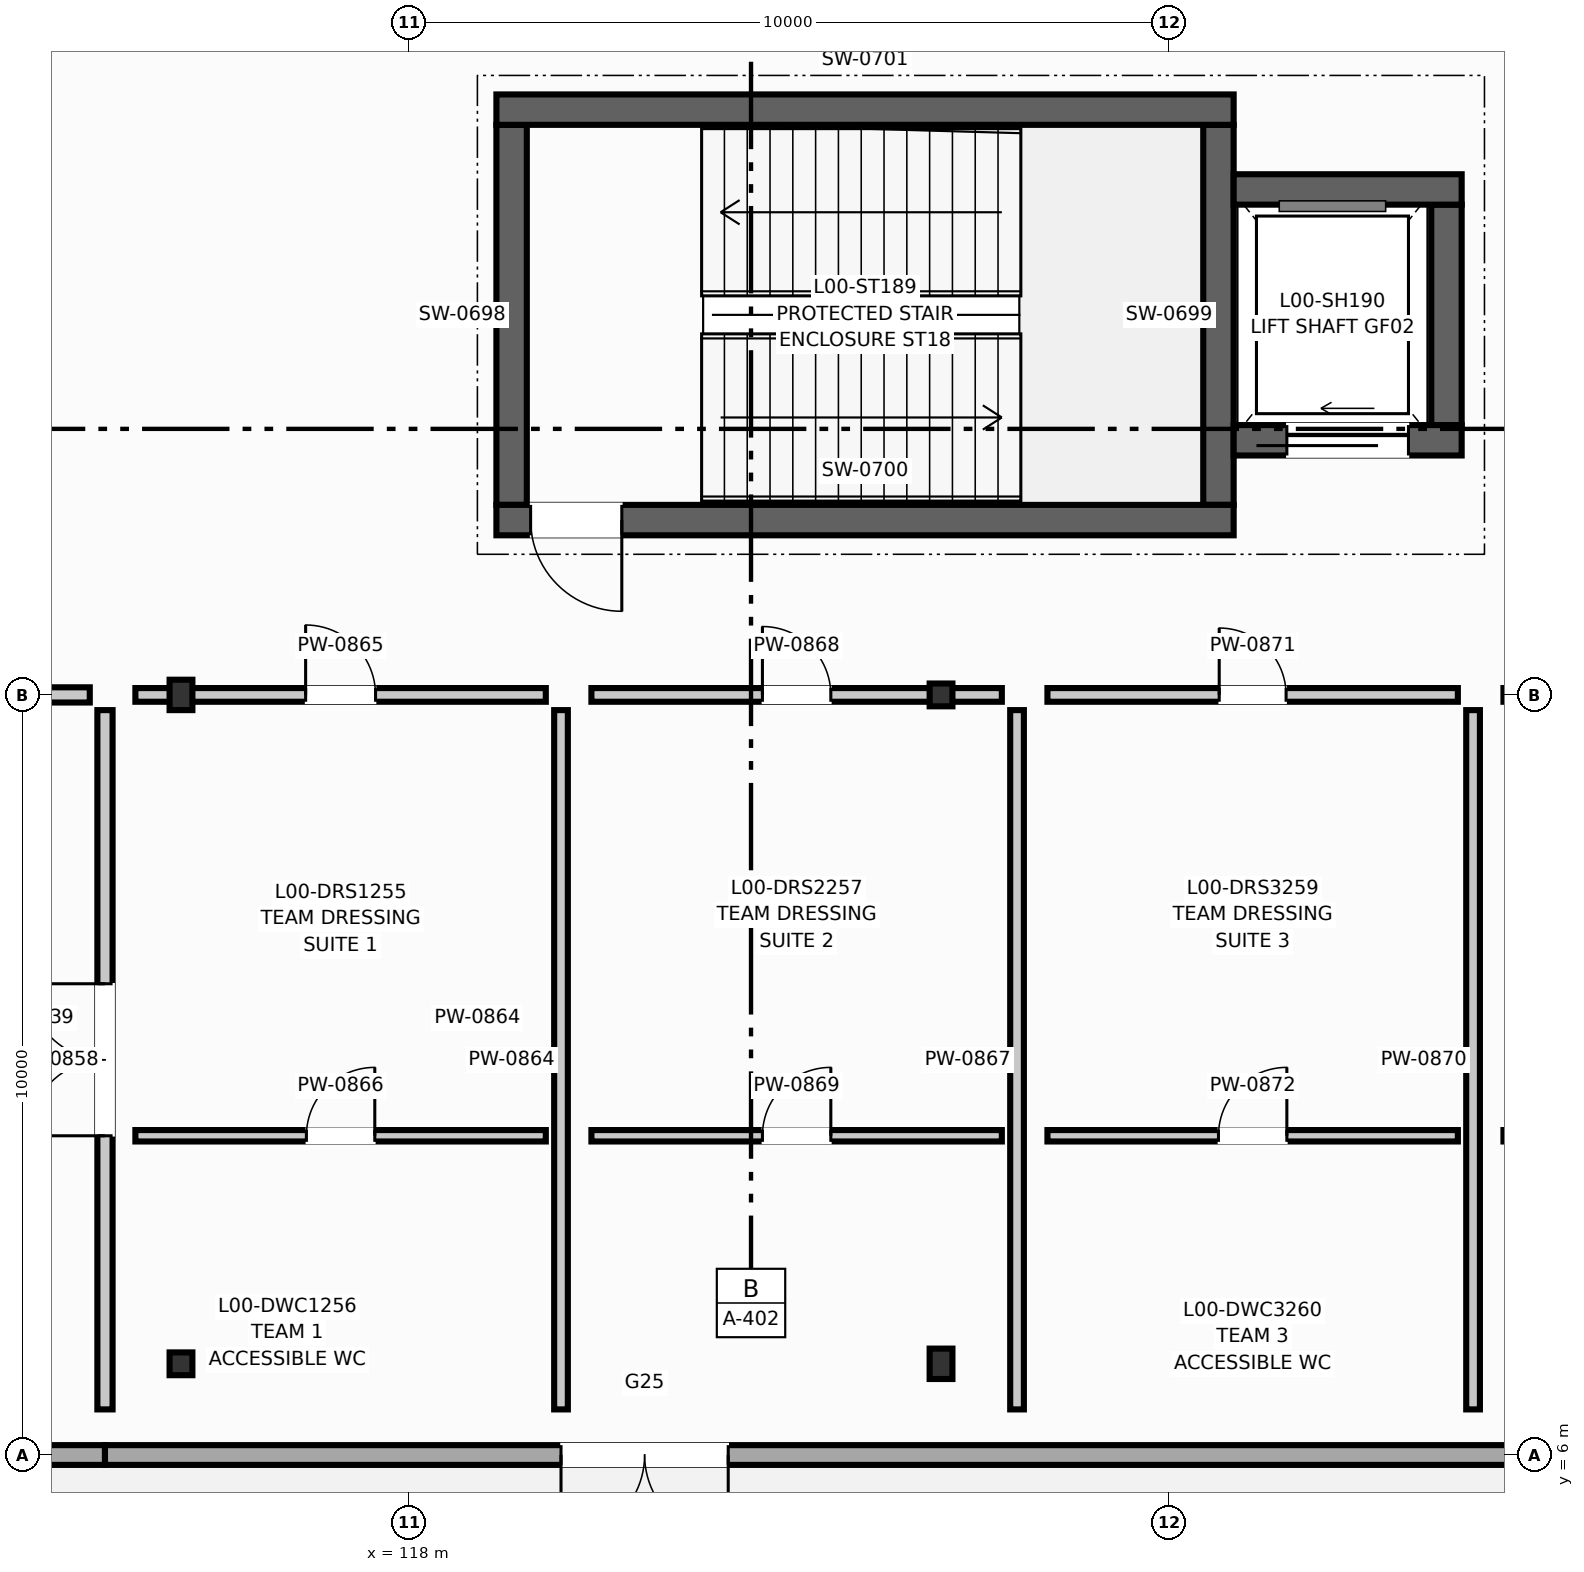
"""IFC4 building model, lengths in metres.
Left out: names, types, materials, properties, quantities, classifications, styles, units other than length and angle.
Written with IfcOpenShell. Run it as: python <this file> out.ifc"""

import sys

from ifc_helpers import new_model, si_unit, direction, frame, frame_2d, origin, origin_2d, place, context, subcontext, project, spatial, rectangle, i_section, extrude, element, fill, save


model = new_model("IFC4")
c1 = context("Model", 3, precision=1e-05, world=origin(), true_north=direction((0.0, 1.0)))
c2 = subcontext(c1, "Body", "Model", "MODEL_VIEW")
j1 = project(units=[si_unit("LENGTHUNIT", "METRE"), si_unit("PLANEANGLEUNIT", "RADIAN")], contexts=[c1])
p1 = place(None, origin())
s1 = spatial("IfcSite", under=j1, at=p1, CompositionType="ELEMENT")
p2 = place(p1, origin())
s2 = spatial("IfcBuilding", under=s1, at=p2, CompositionType="ELEMENT")
p3 = place(p2, origin())
s3 = spatial("IfcBuildingStorey", under=s2, at=p3, CompositionType="ELEMENT", Elevation=0.0)
p4 = place(p3, frame((115.0, 7.2, 0.0), z_axis=(0.0, 0.0, 1.0), x_axis=(1.0, 0.0, 0.0)))
e1 = element("IfcColumn", 1, at=p4, inside=s3, PredefinedType="COLUMN", context=c2, shape_type="SweptSolid", body=[
    extrude(i_section(OverallWidth=0.3, OverallDepth=0.3, WebThickness=0.011, FlangeThickness=0.019, at=origin_2d()), origin(), (0.0, 0.0, 1.0), 4.5),
])
for number, where, z_axis, x_axis in (
    (2, (115.0, 16.0, 0.0), (0.0, 0.0, 1.0), (1.0, 0.0, 0.0)),
    (3, (125.0, 7.2, 0.0), (0.0, 0.0, 1.0), (1.0, 0.0, 0.0)),
):
    element("IfcColumn", number, at=place(p3, frame(where, z_axis=z_axis, x_axis=x_axis)), inside=s3, PredefinedType="COLUMN", context=c2, shape_type="SweptSolid", body=[
        extrude(i_section(OverallWidth=0.3, OverallDepth=0.4, WebThickness=0.013, FlangeThickness=0.024, at=origin_2d()), origin(), (0.0, 0.0, 1.0), 4.5),
    ])
p5 = place(p3, frame((125.0, 16.0, 0.0), z_axis=(0.0, 0.0, 1.0), x_axis=(1.0, 0.0, 0.0)))
e4 = element("IfcColumn", 4, at=p5, inside=s3, PredefinedType="COLUMN", context=c2, shape_type="SweptSolid", body=[
    extrude(i_section(OverallWidth=0.3, OverallDepth=0.3, WebThickness=0.011, FlangeThickness=0.019, at=origin_2d()), origin(), (0.0, 0.0, 1.0), 4.5),
])
p6 = place(p3, frame((74.0, 6.0, 0.0), z_axis=(0.0, 0.0, 1.0), x_axis=(1.0, 0.0, 0.0)))
e5 = element("IfcWall", 5, at=p6, inside=s3, PredefinedType="SOLIDWALL", context=c2, shape_type="SweptSolid", body=[
    extrude(rectangle(XDim=40.0, YDim=0.26, at=frame_2d((20.0, 0.0))), origin(), (0.0, 0.0, 1.0), 4.25),
])
p7 = place(p6, frame((3.2, 0.0, 0.0)))
e6 = element("IfcOpeningElement", 6, at=p7, cuts=e5, PredefinedType="OPENING", context=c2, shape_type="SweptSolid", body=[
    extrude(rectangle(XDim=4.2, YDim=4.1, at=frame_2d((2.1, 2.05))), frame((0.0, 0.14, 0.0), z_axis=(0.0, -1.0, 0.0), x_axis=(1.0, 0.0, 0.0)), (0.0, 0.0, 1.0), 0.28),
])
p8 = place(p6, frame((12.2, 0.0, 0.0)))
e7 = element("IfcOpeningElement", 7, at=p8, cuts=e5, PredefinedType="OPENING", context=c2, shape_type="SweptSolid", body=[
    extrude(rectangle(XDim=4.2, YDim=4.1, at=frame_2d((2.1, 2.05))), frame((0.0, 0.14, 0.0), z_axis=(0.0, -1.0, 0.0), x_axis=(1.0, 0.0, 0.0)), (0.0, 0.0, 1.0), 0.28),
])
p9 = place(p6, frame((21.2, 0.0, 0.0)))
e8 = element("IfcOpeningElement", 8, at=p9, cuts=e5, PredefinedType="OPENING", context=c2, shape_type="SweptSolid", body=[
    extrude(rectangle(XDim=4.2, YDim=4.1, at=frame_2d((2.1, 2.05))), frame((0.0, 0.14, 0.0), z_axis=(0.0, -1.0, 0.0), x_axis=(1.0, 0.0, 0.0)), (0.0, 0.0, 1.0), 0.28),
])
p10 = place(p6, frame((30.2, 0.0, 0.0)))
e9 = element("IfcOpeningElement", 9, at=p10, cuts=e5, PredefinedType="OPENING", context=c2, shape_type="SweptSolid", body=[
    extrude(rectangle(XDim=4.2, YDim=4.1, at=frame_2d((2.1, 2.05))), frame((0.0, 0.14, 0.0), z_axis=(0.0, -1.0, 0.0), x_axis=(1.0, 0.0, 0.0)), (0.0, 0.0, 1.0), 0.28),
])
p11 = place(p3, frame((114.0, 6.0, 0.0), z_axis=(0.0, 0.0, 1.0), x_axis=(1.0, 0.0, 0.0)))
e10 = element("IfcWall", 10, at=p11, inside=s3, PredefinedType="SOLIDWALL", context=c2, shape_type="SweptSolid", body=[
    extrude(rectangle(XDim=50.0, YDim=0.26, at=frame_2d((25.0, 0.0))), origin(), (0.0, 0.0, 1.0), 3.5),
])
p12 = place(p11, frame((25.5, 0.0, 0.0)))
e11 = element("IfcOpeningElement", 11, at=p12, cuts=e10, PredefinedType="OPENING", context=c2, shape_type="SweptSolid", body=[
    extrude(rectangle(XDim=1.1, YDim=2.25, at=frame_2d((0.55, 1.125))), frame((0.0, 0.14, 0.0), z_axis=(0.0, -1.0, 0.0), x_axis=(1.0, 0.0, 0.0)), (0.0, 0.0, 1.0), 0.28),
])
p13 = place(p11, frame((6.0, 0.0, 0.0)))
e12 = element("IfcOpeningElement", 12, at=p13, cuts=e10, PredefinedType="OPENING", context=c2, shape_type="SweptSolid", body=[
    extrude(rectangle(XDim=2.2, YDim=2.45, at=frame_2d((1.1, 1.225))), frame((0.0, 0.14, 0.0), z_axis=(0.0, -1.0, 0.0), x_axis=(1.0, 0.0, 0.0)), (0.0, 0.0, 1.0), 0.28),
])
p14 = place(p11, frame((36.0, 0.0, 0.0)))
e13 = element("IfcOpeningElement", 13, at=p14, cuts=e10, PredefinedType="OPENING", context=c2, shape_type="SweptSolid", body=[
    extrude(rectangle(XDim=2.2, YDim=2.45, at=frame_2d((1.1, 1.225))), frame((0.0, 0.14, 0.0), z_axis=(0.0, -1.0, 0.0), x_axis=(1.0, 0.0, 0.0)), (0.0, 0.0, 1.0), 0.28),
])
for number, where, z_axis, x_axis in (
    (14, (119.35, 18.5, 0.0), (0.0, 0.0, 1.0), (0.0, 1.0, 0.0)),
    (15, (128.65, 18.5, 0.0), (0.0, 0.0, 1.0), (0.0, 1.0, 0.0)),
):
    element("IfcWall", number, at=place(p3, frame(where, z_axis=z_axis, x_axis=x_axis)), inside=s3, PredefinedType="SHEAR", context=c2, shape_type="SweptSolid", body=[
        extrude(rectangle(XDim=5.0, YDim=0.4, at=frame_2d((2.5, 0.0))), origin(), (0.0, 0.0, 1.0), 4.25),
    ])
p15 = place(p3, frame((119.15, 18.3, 0.0), z_axis=(0.0, 0.0, 1.0), x_axis=(1.0, 0.0, 0.0)))
e16 = element("IfcWall", 16, at=p15, inside=s3, PredefinedType="SHEAR", context=c2, shape_type="SweptSolid", body=[
    extrude(rectangle(XDim=9.7, YDim=0.4, at=frame_2d((4.85, 0.0))), origin(), (0.0, 0.0, 1.0), 4.25),
])
p16 = place(p15, frame((0.45, 0.0, 0.0)))
e17 = element("IfcOpeningElement", 17, at=p16, cuts=e16, PredefinedType="OPENING", context=c2, shape_type="SweptSolid", body=[
    extrude(rectangle(XDim=1.2, YDim=2.2, at=frame_2d((0.6, 1.1))), frame((0.0, 0.21, 0.0), z_axis=(0.0, -1.0, 0.0), x_axis=(1.0, 0.0, 0.0)), (0.0, 0.0, 1.0), 0.42),
])
p17 = place(p3, frame((119.15, 23.7, 0.0), z_axis=(0.0, 0.0, 1.0), x_axis=(1.0, 0.0, 0.0)))
e18 = element("IfcWall", 18, at=p17, inside=s3, PredefinedType="SHEAR", context=c2, shape_type="SweptSolid", body=[
    extrude(rectangle(XDim=9.7, YDim=0.4, at=frame_2d((4.85, 0.0))), origin(), (0.0, 0.0, 1.0), 4.25),
])
p18 = place(p3, frame((131.65, 19.55, 0.0), z_axis=(0.0, 0.0, 1.0), x_axis=(0.0, 1.0, 0.0)))
e19 = element("IfcWall", 19, at=p18, inside=s3, PredefinedType="SHEAR", context=c2, shape_type="SweptSolid", body=[
    extrude(rectangle(XDim=2.9, YDim=0.4, at=frame_2d((1.45, 0.0))), origin(), (0.0, 0.0, 1.0), 4.25),
])
p19 = place(p3, frame((128.85, 19.35, 0.0), z_axis=(0.0, 0.0, 1.0), x_axis=(1.0, 0.0, 0.0)))
e20 = element("IfcWall", 20, at=p19, inside=s3, PredefinedType="SHEAR", context=c2, shape_type="SweptSolid", body=[
    extrude(rectangle(XDim=3.0, YDim=0.4, at=frame_2d((1.5, 0.0))), origin(), (0.0, 0.0, 1.0), 4.25),
])
p20 = place(p19, frame((0.7, 0.0, 0.0)))
e21 = element("IfcOpeningElement", 21, at=p20, cuts=e20, PredefinedType="OPENING", context=c2, shape_type="SweptSolid", body=[
    extrude(rectangle(XDim=1.6, YDim=2.35, at=frame_2d((0.8, 1.175))), frame((0.0, 0.21, 0.0), z_axis=(0.0, -1.0, 0.0), x_axis=(1.0, 0.0, 0.0)), (0.0, 0.0, 1.0), 0.42),
])
p21 = place(p3, frame((128.85, 22.65, 0.0), z_axis=(0.0, 0.0, 1.0), x_axis=(1.0, 0.0, 0.0)))
e22 = element("IfcWall", 22, at=p21, inside=s3, PredefinedType="SHEAR", context=c2, shape_type="SweptSolid", body=[
    extrude(rectangle(XDim=3.0, YDim=0.4, at=frame_2d((1.5, 0.0))), origin(), (0.0, 0.0, 1.0), 4.25),
])
p22 = place(p3, frame((114.0, 6.6, 0.0), z_axis=(0.0, 0.0, 1.0), x_axis=(0.0, 1.0, 0.0)))
e23 = element("IfcWall", 23, at=p22, inside=s3, PredefinedType="PARTITIONING", context=c2, shape_type="SweptSolid", body=[
    extrude(rectangle(XDim=9.2, YDim=0.2, at=frame_2d((4.6, 0.0))), origin(), (0.0, 0.0, 1.0), 3.22),
])
p23 = place(p22, frame((3.6, 0.0, 0.0)))
e24 = element("IfcOpeningElement", 24, at=p23, cuts=e23, PredefinedType="OPENING", context=c2, shape_type="SweptSolid", body=[
    extrude(rectangle(XDim=2.0, YDim=2.25, at=frame_2d((1.0, 1.125))), frame((0.0, 0.11, 0.0), z_axis=(0.0, -1.0, 0.0), x_axis=(1.0, 0.0, 0.0)), (0.0, 0.0, 1.0), 0.22),
])
p24 = place(p3, frame((74.6, 16.0, 0.0), z_axis=(0.0, 0.0, 1.0), x_axis=(1.0, 0.0, 0.0)))
e25 = element("IfcWall", 25, at=p24, inside=s3, PredefinedType="PARTITIONING", context=c2, shape_type="SweptSolid", body=[
    extrude(rectangle(XDim=39.2, YDim=0.2, at=frame_2d((19.6, 0.0))), origin(), (0.0, 0.0, 1.0), 3.22),
])
p25 = place(p24, frame((13.112, 0.0, 0.0)))
e26 = element("IfcOpeningElement", 26, at=p25, cuts=e25, PredefinedType="OPENING", context=c2, shape_type="SweptSolid", body=[
    extrude(rectangle(XDim=2.0, YDim=2.25, at=frame_2d((1.0, 1.125))), frame((0.0, 0.11, 0.0), z_axis=(0.0, -1.0, 0.0), x_axis=(1.0, 0.0, 0.0)), (0.0, 0.0, 1.0), 0.22),
])
p26 = place(p3, frame((120.0, 6.6, 0.0), z_axis=(0.0, 0.0, 1.0), x_axis=(0.0, 1.0, 0.0)))
e27 = element("IfcWall", 27, at=p26, inside=s3, PredefinedType="PARTITIONING", context=c2, shape_type="SweptSolid", body=[
    extrude(rectangle(XDim=9.2, YDim=0.18, at=frame_2d((4.6, 0.0))), origin(), (0.0, 0.0, 1.0), 3.22),
])
p27 = place(p3, frame((114.4, 16.0, 0.0), z_axis=(0.0, 0.0, 1.0), x_axis=(1.0, 0.0, 0.0)))
e28 = element("IfcWall", 28, at=p27, inside=s3, PredefinedType="PARTITIONING", context=c2, shape_type="SweptSolid", body=[
    extrude(rectangle(XDim=5.4, YDim=0.18, at=frame_2d((2.7, 0.0))), origin(), (0.0, 0.0, 1.0), 3.22),
])
p28 = place(p27, frame((2.24, 0.0, 0.0)))
e29 = element("IfcOpeningElement", 29, at=p28, cuts=e28, PredefinedType="OPENING", context=c2, shape_type="SweptSolid", body=[
    extrude(rectangle(XDim=0.92, YDim=2.1, at=frame_2d((0.46, 1.05))), frame((0.0, 0.1, 0.0), z_axis=(0.0, -1.0, 0.0), x_axis=(1.0, 0.0, 0.0)), (0.0, 0.0, 1.0), 0.2),
])
p29 = place(p3, frame((114.4, 10.2, 0.0), z_axis=(0.0, 0.0, 1.0), x_axis=(1.0, 0.0, 0.0)))
e30 = element("IfcWall", 30, at=p29, inside=s3, PredefinedType="PARTITIONING", context=c2, shape_type="SweptSolid", body=[
    extrude(rectangle(XDim=5.4, YDim=0.15, at=frame_2d((2.7, 0.0))), origin(), (0.0, 0.0, 1.0), 3.22),
])
p30 = place(p29, frame((2.25, 0.0, 0.0)))
e31 = element("IfcOpeningElement", 31, at=p30, cuts=e30, PredefinedType="OPENING", context=c2, shape_type="SweptSolid", body=[
    extrude(rectangle(XDim=0.9, YDim=2.1, at=frame_2d((0.45, 1.05))), frame((0.0, 0.085, 0.0), z_axis=(0.0, -1.0, 0.0), x_axis=(1.0, 0.0, 0.0)), (0.0, 0.0, 1.0), 0.17),
])
p31 = place(p3, frame((126.0, 6.6, 0.0), z_axis=(0.0, 0.0, 1.0), x_axis=(0.0, 1.0, 0.0)))
e32 = element("IfcWall", 32, at=p31, inside=s3, PredefinedType="PARTITIONING", context=c2, shape_type="SweptSolid", body=[
    extrude(rectangle(XDim=9.2, YDim=0.18, at=frame_2d((4.6, 0.0))), origin(), (0.0, 0.0, 1.0), 3.22),
])
p32 = place(p3, frame((120.4, 16.0, 0.0), z_axis=(0.0, 0.0, 1.0), x_axis=(1.0, 0.0, 0.0)))
e33 = element("IfcWall", 33, at=p32, inside=s3, PredefinedType="PARTITIONING", context=c2, shape_type="SweptSolid", body=[
    extrude(rectangle(XDim=5.4, YDim=0.18, at=frame_2d((2.7, 0.0))), origin(), (0.0, 0.0, 1.0), 3.22),
])
p33 = place(p32, frame((2.25, 0.0, 0.0)))
e34 = element("IfcOpeningElement", 34, at=p33, cuts=e33, PredefinedType="OPENING", context=c2, shape_type="SweptSolid", body=[
    extrude(rectangle(XDim=0.9, YDim=2.1, at=frame_2d((0.45, 1.05))), frame((0.0, 0.1, 0.0), z_axis=(0.0, -1.0, 0.0), x_axis=(1.0, 0.0, 0.0)), (0.0, 0.0, 1.0), 0.2),
])
p34 = place(p3, frame((120.4, 10.2, 0.0), z_axis=(0.0, 0.0, 1.0), x_axis=(1.0, 0.0, 0.0)))
e35 = element("IfcWall", 35, at=p34, inside=s3, PredefinedType="PARTITIONING", context=c2, shape_type="SweptSolid", body=[
    extrude(rectangle(XDim=5.4, YDim=0.15, at=frame_2d((2.7, 0.0))), origin(), (0.0, 0.0, 1.0), 3.22),
])
p35 = place(p34, frame((2.25, 0.0, 0.0)))
e36 = element("IfcOpeningElement", 36, at=p35, cuts=e35, PredefinedType="OPENING", context=c2, shape_type="SweptSolid", body=[
    extrude(rectangle(XDim=0.9, YDim=2.1, at=frame_2d((0.45, 1.05))), frame((0.0, 0.085, 0.0), z_axis=(0.0, -1.0, 0.0), x_axis=(1.0, 0.0, 0.0)), (0.0, 0.0, 1.0), 0.17),
])
p36 = place(p3, frame((132.0, 6.6, 0.0), z_axis=(0.0, 0.0, 1.0), x_axis=(0.0, 1.0, 0.0)))
e37 = element("IfcWall", 37, at=p36, inside=s3, PredefinedType="PARTITIONING", context=c2, shape_type="SweptSolid", body=[
    extrude(rectangle(XDim=9.2, YDim=0.18, at=frame_2d((4.6, 0.0))), origin(), (0.0, 0.0, 1.0), 3.22),
])
p37 = place(p3, frame((126.4, 16.0, 0.0), z_axis=(0.0, 0.0, 1.0), x_axis=(1.0, 0.0, 0.0)))
e38 = element("IfcWall", 38, at=p37, inside=s3, PredefinedType="PARTITIONING", context=c2, shape_type="SweptSolid", body=[
    extrude(rectangle(XDim=5.4, YDim=0.18, at=frame_2d((2.7, 0.0))), origin(), (0.0, 0.0, 1.0), 3.22),
])
p38 = place(p37, frame((2.26, 0.0, 0.0)))
e39 = element("IfcOpeningElement", 39, at=p38, cuts=e38, PredefinedType="OPENING", context=c2, shape_type="SweptSolid", body=[
    extrude(rectangle(XDim=0.88, YDim=2.08, at=frame_2d((0.44, 1.04))), frame((0.0, 0.1, 0.0), z_axis=(0.0, -1.0, 0.0), x_axis=(1.0, 0.0, 0.0)), (0.0, 0.0, 1.0), 0.2),
])
p39 = place(p3, frame((126.4, 10.2, 0.0), z_axis=(0.0, 0.0, 1.0), x_axis=(1.0, 0.0, 0.0)))
e40 = element("IfcWall", 40, at=p39, inside=s3, PredefinedType="PARTITIONING", context=c2, shape_type="SweptSolid", body=[
    extrude(rectangle(XDim=5.4, YDim=0.15, at=frame_2d((2.7, 0.0))), origin(), (0.0, 0.0, 1.0), 3.22),
])
p40 = place(p39, frame((2.25, 0.0, 0.0)))
e41 = element("IfcOpeningElement", 41, at=p40, cuts=e40, PredefinedType="OPENING", context=c2, shape_type="SweptSolid", body=[
    extrude(rectangle(XDim=0.9, YDim=2.1, at=frame_2d((0.45, 1.05))), frame((0.0, 0.085, 0.0), z_axis=(0.0, -1.0, 0.0), x_axis=(1.0, 0.0, 0.0)), (0.0, 0.0, 1.0), 0.17),
])
p41 = place(p13, frame((2.2, 0.0, 0.0), z_axis=(0.0, 0.0, 1.0), x_axis=(-1.0, 0.0, 0.0)))
e42 = element("IfcDoor", 42, at=p41, inside=s3, OperationType="DOUBLE_DOOR_SINGLE_SWING", PredefinedType="DOOR", context=c2, shape_type="SweptSolid", body=[
    extrude(rectangle(XDim=2.2, YDim=2.45, at=frame_2d((1.1, 1.225))), frame((0.0, 0.025, 0.0), z_axis=(0.0, -1.0, 0.0), x_axis=(1.0, 0.0, 0.0)), (0.0, 0.0, 1.0), 0.05),
])
fill(e12, e42)
p42 = place(p16, frame((1.2, 0.0, 0.0), z_axis=(0.0, 0.0, 1.0), x_axis=(-1.0, 0.0, 0.0)))
e43 = element("IfcDoor", 43, at=p42, inside=s3, OperationType="SINGLE_SWING_RIGHT", PredefinedType="DOOR", context=c2, shape_type="SweptSolid", body=[
    extrude(rectangle(XDim=1.2, YDim=2.2, at=frame_2d((0.6, 1.1))), frame((0.0, 0.025, 0.0), z_axis=(0.0, -1.0, 0.0), x_axis=(1.0, 0.0, 0.0)), (0.0, 0.0, 1.0), 0.05),
])
fill(e17, e43)
p43 = place(p20, origin())
e44 = element("IfcDoor", 44, at=p43, inside=s3, OperationType="SLIDING_TO_LEFT", PredefinedType="DOOR", context=c2, shape_type="SweptSolid", body=[
    extrude(rectangle(XDim=1.6, YDim=2.35, at=frame_2d((0.8, 1.175))), frame((0.0, 0.025, 0.0), z_axis=(0.0, -1.0, 0.0), x_axis=(1.0, 0.0, 0.0)), (0.0, 0.0, 1.0), 0.05),
])
fill(e21, e44)
p44 = place(p23, origin())
e45 = element("IfcDoor", 45, at=p44, inside=s3, OperationType="DOUBLE_DOOR_SINGLE_SWING", PredefinedType="DOOR", context=c2, shape_type="SweptSolid", body=[
    extrude(rectangle(XDim=2.0, YDim=2.25, at=frame_2d((1.0, 1.125))), frame((0.0, 0.025, 0.0), z_axis=(0.0, -1.0, 0.0), x_axis=(1.0, 0.0, 0.0)), (0.0, 0.0, 1.0), 0.05),
])
fill(e24, e45)
p45 = place(p28, origin())
e46 = element("IfcDoor", 46, at=p45, inside=s3, OperationType="SINGLE_SWING_LEFT", PredefinedType="DOOR", context=c2, shape_type="SweptSolid", body=[
    extrude(rectangle(XDim=0.92, YDim=2.1, at=frame_2d((0.46, 1.05))), frame((0.0, 0.025, 0.0), z_axis=(0.0, -1.0, 0.0), x_axis=(1.0, 0.0, 0.0)), (0.0, 0.0, 1.0), 0.05),
])
fill(e29, e46)
p46 = place(p30, origin())
e47 = element("IfcDoor", 47, at=p46, inside=s3, OperationType="SINGLE_SWING_RIGHT", PredefinedType="DOOR", context=c2, shape_type="SweptSolid", body=[
    extrude(rectangle(XDim=0.9, YDim=2.1, at=frame_2d((0.45, 1.05))), frame((0.0, 0.025, 0.0), z_axis=(0.0, -1.0, 0.0), x_axis=(1.0, 0.0, 0.0)), (0.0, 0.0, 1.0), 0.05),
])
fill(e31, e47)
p47 = place(p33, origin())
e48 = element("IfcDoor", 48, at=p47, inside=s3, OperationType="SINGLE_SWING_LEFT", PredefinedType="DOOR", context=c2, shape_type="SweptSolid", body=[
    extrude(rectangle(XDim=0.9, YDim=2.1, at=frame_2d((0.45, 1.05))), frame((0.0, 0.025, 0.0), z_axis=(0.0, -1.0, 0.0), x_axis=(1.0, 0.0, 0.0)), (0.0, 0.0, 1.0), 0.05),
])
fill(e34, e48)
p48 = place(p35, origin())
e49 = element("IfcDoor", 49, at=p48, inside=s3, OperationType="SINGLE_SWING_RIGHT", PredefinedType="DOOR", context=c2, shape_type="SweptSolid", body=[
    extrude(rectangle(XDim=0.9, YDim=2.1, at=frame_2d((0.45, 1.05))), frame((0.0, 0.025, 0.0), z_axis=(0.0, -1.0, 0.0), x_axis=(1.0, 0.0, 0.0)), (0.0, 0.0, 1.0), 0.05),
])
fill(e36, e49)
p49 = place(p38, origin())
e50 = element("IfcDoor", 50, at=p49, inside=s3, OperationType="SINGLE_SWING_LEFT", PredefinedType="DOOR", context=c2, shape_type="SweptSolid", body=[
    extrude(rectangle(XDim=0.88, YDim=2.08, at=frame_2d((0.44, 1.04))), frame((0.0, 0.025, 0.0), z_axis=(0.0, -1.0, 0.0), x_axis=(1.0, 0.0, 0.0)), (0.0, 0.0, 1.0), 0.05),
])
fill(e39, e50)
p50 = place(p40, origin())
e51 = element("IfcDoor", 51, at=p50, inside=s3, OperationType="SINGLE_SWING_RIGHT", PredefinedType="DOOR", context=c2, shape_type="SweptSolid", body=[
    extrude(rectangle(XDim=0.9, YDim=2.1, at=frame_2d((0.45, 1.05))), frame((0.0, 0.025, 0.0), z_axis=(0.0, -1.0, 0.0), x_axis=(1.0, 0.0, 0.0)), (0.0, 0.0, 1.0), 0.05),
])
fill(e41, e51)
save(model, sys.argv[1])
